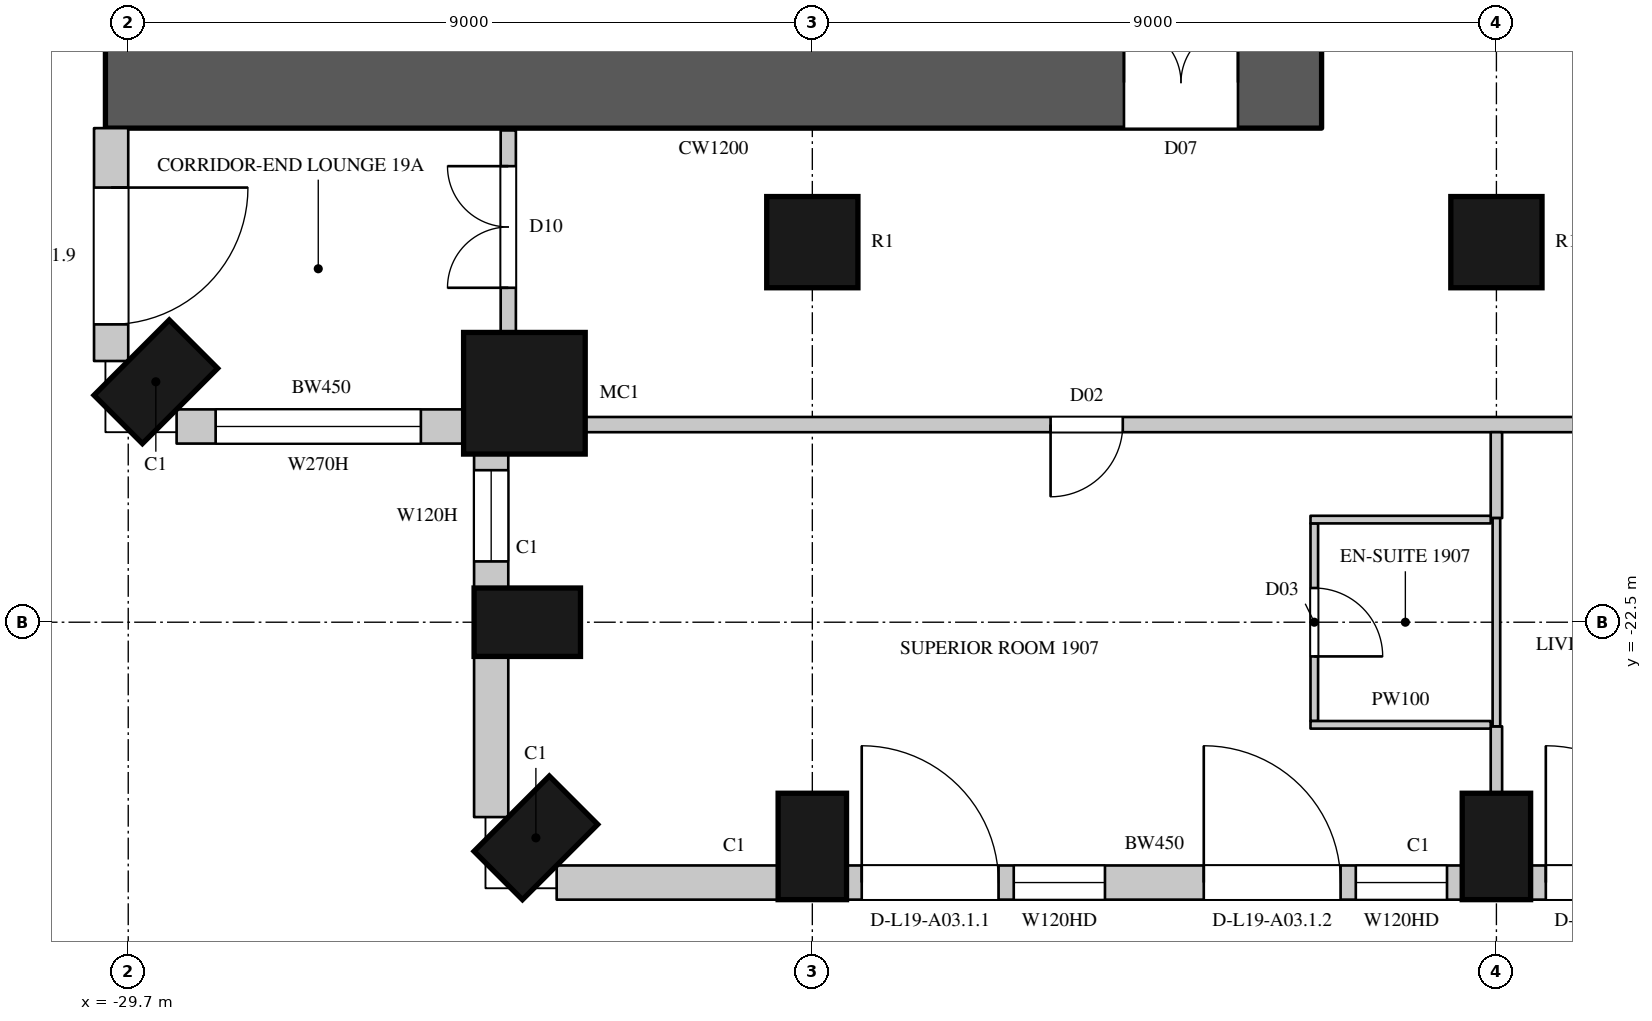
"""IFC4 building model, lengths in metres.
Left out: names, types, materials, properties, quantities, classifications, styles, units other than length and angle.
Written with IfcOpenShell. Run it as: python <this file> out.ifc"""

import sys

from ifc_helpers import new_model, si_unit, direction, frame, frame_2d, origin, origin_2d, place, context, subcontext, project, spatial, rectangle, circle, extrude, element, fill, save


model = new_model("IFC4")
c1 = context("Model", 3, precision=1e-05, world=origin(), true_north=direction((0.0, 1.0)))
c2 = subcontext(c1, "Body", "Model", "MODEL_VIEW")
j1 = project(units=[si_unit("LENGTHUNIT", "METRE"), si_unit("PLANEANGLEUNIT", "RADIAN")], contexts=[c1])
p1 = place(None, origin())
s1 = spatial("IfcSite", under=j1, at=p1, CompositionType="ELEMENT")
p2 = place(p1, origin())
s2 = spatial("IfcBuilding", under=s1, at=p2, CompositionType="ELEMENT")
p3 = place(p2, frame((0.0, 0.0, 98.7)))
s3 = spatial("IfcBuildingStorey", under=s2, at=p3, CompositionType="ELEMENT", Elevation=98.7)
p4 = place(p3, frame((-29.337, -19.337, 0.0), z_axis=(0.0, 0.0, 1.0), x_axis=(0.707106781187, -0.707106781187, 0.0)))
e1 = element("IfcColumn", 1, at=p4, inside=s3, PredefinedType="COLUMN", context=c2, shape_type="SweptSolid", body=[
    extrude(rectangle(XDim=0.9, YDim=1.4, at=origin_2d()), origin(), (0.0, 0.0, 1.0), 3.6),
])
p5 = place(p3, frame((-24.488, -19.488, 0.0), z_axis=(0.0, 0.0, 1.0), x_axis=(1.0, 0.0, 0.0)))
e2 = element("IfcColumn", 2, at=p5, inside=s3, PredefinedType="COLUMN", context=c2, shape_type="SweptSolid", body=[
    extrude(circle(Radius=0.8, at=origin_2d()), origin(), (0.0, 0.0, 1.0), 3.6),
])
for number, where, z_axis, x_axis in (
    (3, (-24.45, -22.5, 0.0), (0.0, 0.0, 1.0), (0.0, -1.0, 0.0)),
    (4, (-24.337, -25.337, 0.0), (0.0, 0.0, 1.0), (0.707, -0.707, 0.0)),
    (5, (-20.7, -25.45, 0.0), (0.0, 0.0, 1.0), (1.0, 0.0, 0.0)),
    (6, (-11.7, -25.45, 0.0), (0.0, 0.0, 1.0), (1.0, 0.0, 0.0)),
):
    element("IfcColumn", number, at=place(p3, frame(where, z_axis=z_axis, x_axis=x_axis)), inside=s3, PredefinedType="COLUMN", context=c2, shape_type="SweptSolid", body=[
        extrude(rectangle(XDim=0.9, YDim=1.4, at=origin_2d()), origin(), (0.0, 0.0, 1.0), 3.6),
    ])
for number, where, z_axis, x_axis in (
    (7, (-20.7, -17.5, 0.0), (0.0, 0.0, 1.0), (1.0, 0.0, 0.0)),
    (8, (-11.7, -17.5, 0.0), (0.0, 0.0, 1.0), (1.0, 0.0, 0.0)),
):
    element("IfcColumn", number, at=place(p3, frame(where, z_axis=z_axis, x_axis=x_axis)), inside=s3, PredefinedType="COLUMN", context=c2, shape_type="SweptSolid", body=[
        extrude(circle(Radius=0.6, at=origin_2d()), origin(), (0.0, 0.0, 1.0), 3.6),
    ])
p6 = place(p3, frame((-29.925, -16.0, 0.0), z_axis=(0.0, 0.0, 1.0), x_axis=(0.0, -1.0, 0.0)))
e9 = element("IfcWall", 9, at=p6, inside=s3, PredefinedType="SOLIDWALL", context=c2, shape_type="SweptSolid", body=[
    extrude(rectangle(XDim=3.064, YDim=0.45, at=frame_2d((1.532, 0.0))), origin(), (0.0, 0.0, 1.0), 3.3),
])
p7 = place(p6, frame((0.782, 0.0, 0.0)))
e10 = element("IfcOpeningElement", 10, at=p7, cuts=e9, PredefinedType="OPENING", context=c2, shape_type="SweptSolid", body=[
    extrude(rectangle(XDim=1.8, YDim=2.4, at=frame_2d((0.9, 1.2))), frame((0.0, 0.235, 0.0), z_axis=(0.0, -1.0, 0.0), x_axis=(1.0, 0.0, 0.0)), (0.0, 0.0, 1.0), 0.47),
])
p8 = place(p3, frame((-29.064, -19.925, 0.0), z_axis=(0.0, 0.0, 1.0), x_axis=(1.0, 0.0, 0.0)))
e11 = element("IfcWall", 11, at=p8, inside=s3, PredefinedType="SOLIDWALL", context=c2, shape_type="SweptSolid", body=[
    extrude(rectangle(XDim=3.805, YDim=0.45, at=frame_2d((1.903, 0.0))), origin(), (0.0, 0.0, 1.0), 3.3),
])
p9 = place(p8, frame((0.514, 0.0, 1.05)))
e12 = element("IfcOpeningElement", 12, at=p9, cuts=e11, PredefinedType="OPENING", context=c2, shape_type="SweptSolid", body=[
    extrude(rectangle(XDim=2.7, YDim=2.0, at=frame_2d((1.35, 1.0))), frame((0.0, 0.235, 0.0), z_axis=(0.0, -1.0, 0.0), x_axis=(1.0, 0.0, 0.0)), (0.0, 0.0, 1.0), 0.47),
])
p10 = place(p3, frame((-24.925, -20.259, 0.0), z_axis=(0.0, 0.0, 1.0), x_axis=(0.0, -1.0, 0.0)))
e13 = element("IfcWall", 13, at=p10, inside=s3, PredefinedType="SOLIDWALL", context=c2, shape_type="SweptSolid", body=[
    extrude(rectangle(XDim=1.792, YDim=0.45, at=frame_2d((0.896, 0.0))), origin(), (0.0, 0.0, 1.0), 3.3),
])
p11 = place(p10, frame((0.241, 0.0, 1.05)))
e14 = element("IfcOpeningElement", 14, at=p11, cuts=e13, PredefinedType="OPENING", context=c2, shape_type="SweptSolid", body=[
    extrude(rectangle(XDim=1.2, YDim=2.0, at=frame_2d((0.6, 1.0))), frame((0.0, 0.235, 0.0), z_axis=(0.0, -1.0, 0.0), x_axis=(1.0, 0.0, 0.0)), (0.0, 0.0, 1.0), 0.47),
])
p12 = place(p3, frame((-24.925, -22.95, 0.0), z_axis=(0.0, 0.0, 1.0), x_axis=(0.0, -1.0, 0.0)))
e15 = element("IfcWall", 15, at=p12, inside=s3, PredefinedType="SOLIDWALL", context=c2, shape_type="SweptSolid", body=[
    extrude(rectangle(XDim=2.114, YDim=0.45, at=frame_2d((1.057, 0.0))), origin(), (0.0, 0.0, 1.0), 3.3),
])
p13 = place(p3, frame((-24.064, -25.925, 0.0), z_axis=(0.0, 0.0, 1.0), x_axis=(1.0, 0.0, 0.0)))
e16 = element("IfcWall", 16, at=p13, inside=s3, PredefinedType="SOLIDWALL", context=c2, shape_type="SweptSolid", body=[
    extrude(rectangle(XDim=2.914, YDim=0.45, at=frame_2d((1.457, 0.0))), origin(), (0.0, 0.0, 1.0), 3.3),
])
p14 = place(p3, frame((-20.25, -25.925, 0.0), z_axis=(0.0, 0.0, 1.0), x_axis=(1.0, 0.0, 0.0)))
e17 = element("IfcWall", 17, at=p14, inside=s3, PredefinedType="SOLIDWALL", context=c2, shape_type="SweptSolid", body=[
    extrude(rectangle(XDim=8.1, YDim=0.45, at=frame_2d((4.05, 0.0))), origin(), (0.0, 0.0, 1.0), 3.3),
])
p15 = place(p14, frame((0.2, 0.0, 0.0)))
e18 = element("IfcOpeningElement", 18, at=p15, cuts=e17, PredefinedType="OPENING", context=c2, shape_type="SweptSolid", body=[
    extrude(rectangle(XDim=1.8, YDim=2.4, at=frame_2d((0.9, 1.2))), frame((0.0, 0.235, 0.0), z_axis=(0.0, -1.0, 0.0), x_axis=(1.0, 0.0, 0.0)), (0.0, 0.0, 1.0), 0.47),
])
p16 = place(p14, frame((2.2, 0.0, 1.05)))
e19 = element("IfcOpeningElement", 19, at=p16, cuts=e17, PredefinedType="OPENING", context=c2, shape_type="SweptSolid", body=[
    extrude(rectangle(XDim=1.2, YDim=2.0, at=frame_2d((0.6, 1.0))), frame((0.0, 0.235, 0.0), z_axis=(0.0, -1.0, 0.0), x_axis=(1.0, 0.0, 0.0)), (0.0, 0.0, 1.0), 0.47),
])
p17 = place(p14, frame((4.7, 0.0, 0.0)))
e20 = element("IfcOpeningElement", 20, at=p17, cuts=e17, PredefinedType="OPENING", context=c2, shape_type="SweptSolid", body=[
    extrude(rectangle(XDim=1.8, YDim=2.4, at=frame_2d((0.9, 1.2))), frame((0.0, 0.235, 0.0), z_axis=(0.0, -1.0, 0.0), x_axis=(1.0, 0.0, 0.0)), (0.0, 0.0, 1.0), 0.47),
])
p18 = place(p14, frame((6.7, 0.0, 1.05)))
e21 = element("IfcOpeningElement", 21, at=p18, cuts=e17, PredefinedType="OPENING", context=c2, shape_type="SweptSolid", body=[
    extrude(rectangle(XDim=1.2, YDim=2.0, at=frame_2d((0.6, 1.0))), frame((0.0, 0.235, 0.0), z_axis=(0.0, -1.0, 0.0), x_axis=(1.0, 0.0, 0.0)), (0.0, 0.0, 1.0), 0.47),
])
p19 = place(p3, frame((-11.25, -25.925, 0.0), z_axis=(0.0, 0.0, 1.0), x_axis=(1.0, 0.0, 0.0)))
e22 = element("IfcWall", 22, at=p19, inside=s3, PredefinedType="SOLIDWALL", context=c2, shape_type="SweptSolid", body=[
    extrude(rectangle(XDim=8.1, YDim=0.45, at=frame_2d((4.05, 0.0))), origin(), (0.0, 0.0, 1.0), 3.3),
])
p20 = place(p19, frame((0.2, 0.0, 0.0)))
e23 = element("IfcOpeningElement", 23, at=p20, cuts=e22, PredefinedType="OPENING", context=c2, shape_type="SweptSolid", body=[
    extrude(rectangle(XDim=1.8, YDim=2.4, at=frame_2d((0.9, 1.2))), frame((0.0, 0.235, 0.0), z_axis=(0.0, -1.0, 0.0), x_axis=(1.0, 0.0, 0.0)), (0.0, 0.0, 1.0), 0.47),
])
p21 = place(p19, frame((2.2, 0.0, 1.05)))
e24 = element("IfcOpeningElement", 24, at=p21, cuts=e22, PredefinedType="OPENING", context=c2, shape_type="SweptSolid", body=[
    extrude(rectangle(XDim=1.2, YDim=2.0, at=frame_2d((0.6, 1.0))), frame((0.0, 0.235, 0.0), z_axis=(0.0, -1.0, 0.0), x_axis=(1.0, 0.0, 0.0)), (0.0, 0.0, 1.0), 0.47),
])
p22 = place(p19, frame((4.7, 0.0, 0.0)))
e25 = element("IfcOpeningElement", 25, at=p22, cuts=e22, PredefinedType="OPENING", context=c2, shape_type="SweptSolid", body=[
    extrude(rectangle(XDim=1.8, YDim=2.4, at=frame_2d((0.9, 1.2))), frame((0.0, 0.235, 0.0), z_axis=(0.0, -1.0, 0.0), x_axis=(1.0, 0.0, 0.0)), (0.0, 0.0, 1.0), 0.47),
])
p23 = place(p19, frame((6.7, 0.0, 1.05)))
e26 = element("IfcOpeningElement", 26, at=p23, cuts=e22, PredefinedType="OPENING", context=c2, shape_type="SweptSolid", body=[
    extrude(rectangle(XDim=1.2, YDim=2.0, at=frame_2d((0.6, 1.0))), frame((0.0, 0.235, 0.0), z_axis=(0.0, -1.0, 0.0), x_axis=(1.0, 0.0, 0.0)), (0.0, 0.0, 1.0), 0.47),
])
p24 = place(p3, frame((-30.0, -15.4, 0.0), z_axis=(0.0, 0.0, 1.0), x_axis=(1.0, 0.0, 0.0)))
e27 = element("IfcWall", 27, at=p24, inside=s3, PredefinedType="SHEAR", context=c2, shape_type="SweptSolid", body=[
    extrude(rectangle(XDim=16.0, YDim=1.2, at=frame_2d((8.0, 0.0))), origin(), (0.0, 0.0, 1.0), 3.6),
])
p25 = place(p24, frame((13.4, 0.0, 0.0)))
e28 = element("IfcOpeningElement", 28, at=p25, cuts=e27, PredefinedType="OPENING", context=c2, shape_type="SweptSolid", body=[
    extrude(rectangle(XDim=1.5, YDim=2.4, at=frame_2d((0.75, 1.2))), frame((0.0, 0.61, 0.0), z_axis=(0.0, -1.0, 0.0), x_axis=(1.0, 0.0, 0.0)), (0.0, 0.0, 1.0), 1.22),
])
p26 = place(p3, frame((-24.7, -18.7, 0.0), z_axis=(0.0, 0.0, 1.0), x_axis=(0.0, 1.0, 0.0)))
e29 = element("IfcWall", 29, at=p26, inside=s3, PredefinedType="PARTITIONING", context=c2, shape_type="SweptSolid", body=[
    extrude(rectangle(XDim=2.67, YDim=0.2, at=frame_2d((1.335, 0.0))), origin(), (0.0, 0.0, 1.0), 3.3),
])
p27 = place(p26, frame((0.6, 0.0, 0.0)))
e30 = element("IfcOpeningElement", 30, at=p27, cuts=e29, PredefinedType="OPENING", context=c2, shape_type="SweptSolid", body=[
    extrude(rectangle(XDim=1.6, YDim=2.4, at=frame_2d((0.8, 1.2))), frame((0.0, 0.11, 0.0), z_axis=(0.0, -1.0, 0.0), x_axis=(1.0, 0.0, 0.0)), (0.0, 0.0, 1.0), 0.22),
])
p28 = place(p3, frame((-23.765, -19.9, 0.0), z_axis=(0.0, 0.0, 1.0), x_axis=(1.0, 0.0, 0.0)))
e31 = element("IfcWall", 31, at=p28, inside=s3, PredefinedType="PARTITIONING", context=c2, shape_type="SweptSolid", body=[
    extrude(rectangle(XDim=42.125, YDim=0.2, at=frame_2d((21.063, 0.0))), origin(), (0.0, 0.0, 1.0), 3.3),
])
p29 = place(p28, frame((6.2, 0.0, 0.0)))
e32 = element("IfcOpeningElement", 32, at=p29, cuts=e31, PredefinedType="OPENING", context=c2, shape_type="SweptSolid", body=[
    extrude(rectangle(XDim=0.95, YDim=2.2, at=frame_2d((0.475, 1.1))), frame((0.0, 0.11, 0.0), z_axis=(0.0, -1.0, 0.0), x_axis=(1.0, 0.0, 0.0)), (0.0, 0.0, 1.0), 0.22),
])
p30 = place(p28, frame((14.1, 0.0, 0.0)))
e33 = element("IfcOpeningElement", 33, at=p30, cuts=e31, PredefinedType="OPENING", context=c2, shape_type="SweptSolid", body=[
    extrude(rectangle(XDim=1.1, YDim=2.4, at=frame_2d((0.55, 1.2))), frame((0.0, 0.11, 0.0), z_axis=(0.0, -1.0, 0.0), x_axis=(1.0, 0.0, 0.0)), (0.0, 0.0, 1.0), 0.22),
])
p31 = place(p28, frame((24.2, 0.0, 0.0)))
e34 = element("IfcOpeningElement", 34, at=p31, cuts=e31, PredefinedType="OPENING", context=c2, shape_type="SweptSolid", body=[
    extrude(rectangle(XDim=0.95, YDim=2.2, at=frame_2d((0.475, 1.1))), frame((0.0, 0.11, 0.0), z_axis=(0.0, -1.0, 0.0), x_axis=(1.0, 0.0, 0.0)), (0.0, 0.0, 1.0), 0.22),
])
p32 = place(p28, frame((32.9, 0.0, 0.0)))
e35 = element("IfcOpeningElement", 35, at=p32, cuts=e31, PredefinedType="OPENING", context=c2, shape_type="SweptSolid", body=[
    extrude(rectangle(XDim=1.1, YDim=2.4, at=frame_2d((0.55, 1.2))), frame((0.0, 0.11, 0.0), z_axis=(0.0, -1.0, 0.0), x_axis=(1.0, 0.0, 0.0)), (0.0, 0.0, 1.0), 0.22),
])
p33 = place(p3, frame((-11.7, -24.75, 0.0), z_axis=(0.0, 0.0, 1.0), x_axis=(0.0, 1.0, 0.0)))
e36 = element("IfcWall", 36, at=p33, inside=s3, PredefinedType="PARTITIONING", context=c2, shape_type="SweptSolid", body=[
    extrude(rectangle(XDim=0.88, YDim=0.15, at=frame_2d((0.44, 0.0))), origin(), (0.0, 0.0, 1.0), 2.75),
])
p34 = place(p3, frame((-11.7, -21.13, 0.0), z_axis=(0.0, 0.0, 1.0), x_axis=(0.0, 1.0, 0.0)))
e37 = element("IfcWall", 37, at=p34, inside=s3, PredefinedType="PARTITIONING", context=c2, shape_type="SweptSolid", body=[
    extrude(rectangle(XDim=1.13, YDim=0.15, at=frame_2d((0.565, 0.0))), origin(), (0.0, 0.0, 1.0), 2.75),
])
p35 = place(p3, frame((-14.096, -23.8, 0.0), z_axis=(0.0, 0.0, 1.0), x_axis=(0.0, 1.0, 0.0)))
e38 = element("IfcWall", 38, at=p35, inside=s3, PredefinedType="PARTITIONING", context=c2, shape_type="SweptSolid", body=[
    extrude(rectangle(XDim=2.6, YDim=0.1, at=frame_2d((1.3, 0.0))), origin(), (0.0, 0.0, 1.0), 3.3),
])
p36 = place(p35, frame((0.85, 0.0, 0.0)))
e39 = element("IfcOpeningElement", 39, at=p36, cuts=e38, PredefinedType="OPENING", context=c2, shape_type="SweptSolid", body=[
    extrude(rectangle(XDim=0.9, YDim=2.2, at=frame_2d((0.45, 1.1))), frame((0.0, 0.06, 0.0), z_axis=(0.0, -1.0, 0.0), x_axis=(1.0, 0.0, 0.0)), (0.0, 0.0, 1.0), 0.12),
])
for number, where, z_axis, x_axis in (
    (40, (-14.146, -23.85, 0.0), (0.0, 0.0, 1.0), (1.0, 0.0, 0.0)),
    (41, (-14.146, -21.15, 0.0), (0.0, 0.0, 1.0), (1.0, 0.0, 0.0)),
):
    element("IfcWall", number, at=place(p3, frame(where, z_axis=z_axis, x_axis=x_axis)), inside=s3, PredefinedType="PARTITIONING", context=c2, shape_type="SweptSolid", body=[
        extrude(rectangle(XDim=2.371, YDim=0.1, at=frame_2d((1.186, 0.0))), origin(), (0.0, 0.0, 1.0), 3.3),
    ])
p37 = place(p3, frame((-11.7, -23.87, 0.0), z_axis=(0.0, 0.0, 1.0), x_axis=(0.0, 1.0, 0.0)))
e42 = element("IfcWall", 42, at=p37, inside=s3, PredefinedType="PARTITIONING", context=c2, shape_type="SweptSolid", body=[
    extrude(rectangle(XDim=2.74, YDim=0.1, at=frame_2d((1.37, 0.0))), origin(), (0.0, 0.0, 1.0), 2.75),
])
p38 = place(p7, origin())
e43 = element("IfcDoor", 43, at=p38, inside=s3, OperationType="SLIDING_TO_LEFT", PredefinedType="DOOR", context=c2, shape_type="SweptSolid", body=[
    extrude(rectangle(XDim=1.8, YDim=2.4, at=frame_2d((0.9, 1.2))), frame((0.0, 0.13, 0.0), z_axis=(0.0, -1.0, 0.0), x_axis=(1.0, 0.0, 0.0)), (0.0, 0.0, 1.0), 0.05),
])
fill(e10, e43)
p39 = place(p9, origin())
e44 = element("IfcWindow", 44, at=p39, inside=s3, PartitioningType="SINGLE_PANEL", PredefinedType="WINDOW", context=c2, shape_type="SweptSolid", body=[
    extrude(rectangle(XDim=2.7, YDim=2.0, at=frame_2d((1.35, 1.0))), frame((0.0, 0.135, 0.0), z_axis=(0.0, -1.0, 0.0), x_axis=(1.0, 0.0, 0.0)), (0.0, 0.0, 1.0), 0.06),
])
fill(e12, e44)
p40 = place(p11, origin())
e45 = element("IfcWindow", 45, at=p40, inside=s3, PartitioningType="SINGLE_PANEL", PredefinedType="WINDOW", context=c2, shape_type="SweptSolid", body=[
    extrude(rectangle(XDim=1.2, YDim=2.0, at=frame_2d((0.6, 1.0))), frame((0.0, 0.135, 0.0), z_axis=(0.0, -1.0, 0.0), x_axis=(1.0, 0.0, 0.0)), (0.0, 0.0, 1.0), 0.06),
])
fill(e14, e45)
p41 = place(p15, origin())
e46 = element("IfcDoor", 46, at=p41, inside=s3, OperationType="SLIDING_TO_LEFT", PredefinedType="DOOR", context=c2, shape_type="SweptSolid", body=[
    extrude(rectangle(XDim=1.8, YDim=2.4, at=frame_2d((0.9, 1.2))), frame((0.0, 0.13, 0.0), z_axis=(0.0, -1.0, 0.0), x_axis=(1.0, 0.0, 0.0)), (0.0, 0.0, 1.0), 0.05),
])
fill(e18, e46)
p42 = place(p16, origin())
e47 = element("IfcWindow", 47, at=p42, inside=s3, PartitioningType="SINGLE_PANEL", PredefinedType="WINDOW", context=c2, shape_type="SweptSolid", body=[
    extrude(rectangle(XDim=1.2, YDim=2.0, at=frame_2d((0.6, 1.0))), frame((0.0, 0.135, 0.0), z_axis=(0.0, -1.0, 0.0), x_axis=(1.0, 0.0, 0.0)), (0.0, 0.0, 1.0), 0.06),
])
fill(e19, e47)
p43 = place(p17, origin())
e48 = element("IfcDoor", 48, at=p43, inside=s3, OperationType="SLIDING_TO_LEFT", PredefinedType="DOOR", context=c2, shape_type="SweptSolid", body=[
    extrude(rectangle(XDim=1.8, YDim=2.4, at=frame_2d((0.9, 1.2))), frame((0.0, 0.13, 0.0), z_axis=(0.0, -1.0, 0.0), x_axis=(1.0, 0.0, 0.0)), (0.0, 0.0, 1.0), 0.05),
])
fill(e20, e48)
p44 = place(p18, origin())
e49 = element("IfcWindow", 49, at=p44, inside=s3, PartitioningType="SINGLE_PANEL", PredefinedType="WINDOW", context=c2, shape_type="SweptSolid", body=[
    extrude(rectangle(XDim=1.2, YDim=2.0, at=frame_2d((0.6, 1.0))), frame((0.0, 0.135, 0.0), z_axis=(0.0, -1.0, 0.0), x_axis=(1.0, 0.0, 0.0)), (0.0, 0.0, 1.0), 0.06),
])
fill(e21, e49)
p45 = place(p20, origin())
e50 = element("IfcDoor", 50, at=p45, inside=s3, OperationType="SLIDING_TO_LEFT", PredefinedType="DOOR", context=c2, shape_type="SweptSolid", body=[
    extrude(rectangle(XDim=1.8, YDim=2.4, at=frame_2d((0.9, 1.2))), frame((0.0, 0.13, 0.0), z_axis=(0.0, -1.0, 0.0), x_axis=(1.0, 0.0, 0.0)), (0.0, 0.0, 1.0), 0.05),
])
fill(e23, e50)
p46 = place(p27, origin())
e51 = element("IfcDoor", 51, at=p46, inside=s3, OperationType="DOUBLE_DOOR_SINGLE_SWING", PredefinedType="DOOR", context=c2, shape_type="SweptSolid", body=[
    extrude(rectangle(XDim=1.6, YDim=2.4, at=frame_2d((0.8, 1.2))), frame((0.0, 0.025, 0.0), z_axis=(0.0, -1.0, 0.0), x_axis=(1.0, 0.0, 0.0)), (0.0, 0.0, 1.0), 0.05),
])
fill(e30, e51)
p47 = place(p29, origin())
e52 = element("IfcDoor", 52, at=p47, inside=s3, OperationType="SINGLE_SWING_RIGHT", PredefinedType="DOOR", context=c2, shape_type="SweptSolid", body=[
    extrude(rectangle(XDim=0.95, YDim=2.2, at=frame_2d((0.475, 1.1))), frame((0.0, 0.025, 0.0), z_axis=(0.0, -1.0, 0.0), x_axis=(1.0, 0.0, 0.0)), (0.0, 0.0, 1.0), 0.05),
])
fill(e32, e52)
p48 = place(p36, origin())
e53 = element("IfcDoor", 53, at=p48, inside=s3, OperationType="SINGLE_SWING_RIGHT", PredefinedType="DOOR", context=c2, shape_type="SweptSolid", body=[
    extrude(rectangle(XDim=0.9, YDim=2.2, at=frame_2d((0.45, 1.1))), frame((0.0, 0.025, 0.0), z_axis=(0.0, -1.0, 0.0), x_axis=(1.0, 0.0, 0.0)), (0.0, 0.0, 1.0), 0.05),
])
fill(e39, e53)
p49 = place(p25, origin())
e54 = element("IfcDoor", 54, at=p49, inside=s3, OperationType="DOUBLE_DOOR_SINGLE_SWING", PredefinedType="DOOR", context=c2, shape_type="SweptSolid", body=[
    extrude(rectangle(XDim=1.5, YDim=2.4, at=frame_2d((0.75, 1.2))), frame((0.0, 0.025, 0.0), z_axis=(0.0, -1.0, 0.0), x_axis=(1.0, 0.0, 0.0)), (0.0, 0.0, 1.0), 0.05),
])
fill(e28, e54)
save(model, sys.argv[1])
